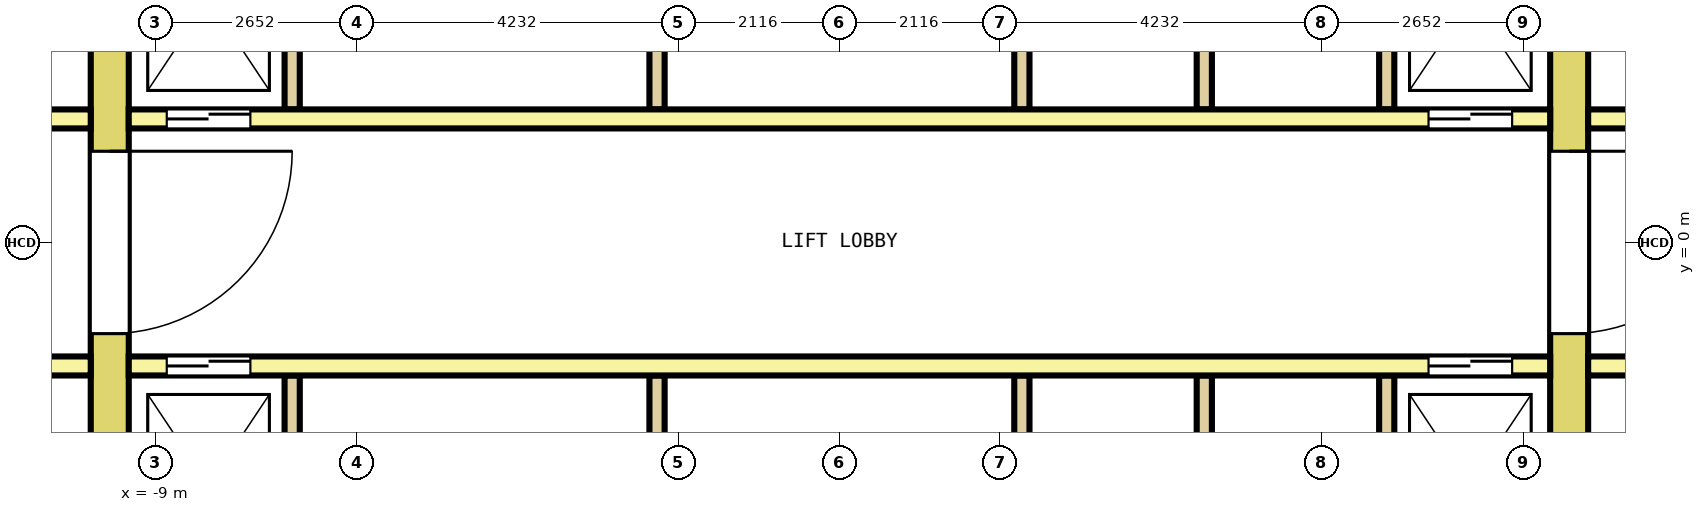
"""IFC4 building model, lengths in metres.
Left out: names, types, materials, properties, quantities, classifications, styles, units other than length and angle.
Written with IfcOpenShell. Run it as: python <this file> out.ifc"""

import sys

from ifc_helpers import new_model, si_unit, direction, frame, frame_2d, origin, place, context, subcontext, project, spatial, rectangle, extrude, element, fill, save


model = new_model("IFC4")
c1 = context("Model", 3, precision=1e-05, world=origin(), true_north=direction((0.0, 1.0)))
c2 = subcontext(c1, "Body", "Model", "MODEL_VIEW")
j1 = project(units=[si_unit("LENGTHUNIT", "METRE"), si_unit("PLANEANGLEUNIT", "RADIAN")], contexts=[c1])
p1 = place(None, origin())
s1 = spatial("IfcSite", under=j1, at=p1, CompositionType="ELEMENT")
p2 = place(p1, origin())
s2 = spatial("IfcBuilding", under=s1, at=p2, CompositionType="ELEMENT")
p3 = place(p2, frame((0.0, 0.0, 58.6)))
s3 = spatial("IfcBuildingStorey", under=s2, at=p3, CompositionType="ELEMENT", Elevation=58.6)
p4 = place(p3, frame((-9.6, -7.7, 0.0), z_axis=(0.0, 0.0, 1.0), x_axis=(0.0, 1.0, 0.0)))
e1 = element("IfcWall", 1, at=p4, inside=s3, PredefinedType="SHEAR", context=c2, shape_type="SweptSolid", body=[
    extrude(rectangle(XDim=15.4, YDim=0.5, at=frame_2d((7.7, 0.0))), origin(), (0.0, 0.0, 1.0), 4.1),
])
p5 = place(p4, frame((6.5, 0.0, 0.0)))
e2 = element("IfcOpeningElement", 2, at=p5, cuts=e1, PredefinedType="OPENING", context=c2, shape_type="SweptSolid", body=[
    extrude(rectangle(XDim=2.4, YDim=2.1, at=frame_2d((1.2, 1.05))), frame((0.0, 0.26, 0.0), z_axis=(0.0, -1.0, 0.0), x_axis=(1.0, 0.0, 0.0)), (0.0, 0.0, 1.0), 0.52),
])
p6 = place(p4, frame((13.4, 0.0, 0.0)))
e3 = element("IfcOpeningElement", 3, at=p6, cuts=e1, PredefinedType="OPENING", context=c2, shape_type="SweptSolid", body=[
    extrude(rectangle(XDim=1.2, YDim=2.1, at=frame_2d((0.6, 1.05))), frame((0.0, 0.26, 0.0), z_axis=(0.0, -1.0, 0.0), x_axis=(1.0, 0.0, 0.0)), (0.0, 0.0, 1.0), 0.52),
])
p7 = place(p4, frame((0.8, 0.0, 0.0)))
e4 = element("IfcOpeningElement", 4, at=p7, cuts=e1, PredefinedType="OPENING", context=c2, shape_type="SweptSolid", body=[
    extrude(rectangle(XDim=1.2, YDim=2.1, at=frame_2d((0.6, 1.05))), frame((0.0, 0.26, 0.0), z_axis=(0.0, -1.0, 0.0), x_axis=(1.0, 0.0, 0.0)), (0.0, 0.0, 1.0), 0.52),
])
p8 = place(p3, frame((9.6, -7.7, 0.0), z_axis=(0.0, 0.0, 1.0), x_axis=(0.0, 1.0, 0.0)))
e5 = element("IfcWall", 5, at=p8, inside=s3, PredefinedType="SHEAR", context=c2, shape_type="SweptSolid", body=[
    extrude(rectangle(XDim=15.4, YDim=0.5, at=frame_2d((7.7, 0.0))), origin(), (0.0, 0.0, 1.0), 4.1),
])
p9 = place(p8, frame((6.5, 0.0, 0.0)))
e6 = element("IfcOpeningElement", 6, at=p9, cuts=e5, PredefinedType="OPENING", context=c2, shape_type="SweptSolid", body=[
    extrude(rectangle(XDim=2.4, YDim=2.1, at=frame_2d((1.2, 1.05))), frame((0.0, 0.26, 0.0), z_axis=(0.0, -1.0, 0.0), x_axis=(1.0, 0.0, 0.0)), (0.0, 0.0, 1.0), 0.52),
])
p10 = place(p8, frame((13.4, 0.0, 0.0)))
e7 = element("IfcOpeningElement", 7, at=p10, cuts=e5, PredefinedType="OPENING", context=c2, shape_type="SweptSolid", body=[
    extrude(rectangle(XDim=1.2, YDim=2.1, at=frame_2d((0.6, 1.05))), frame((0.0, 0.26, 0.0), z_axis=(0.0, -1.0, 0.0), x_axis=(1.0, 0.0, 0.0)), (0.0, 0.0, 1.0), 0.52),
])
p11 = place(p8, frame((0.9, 0.0, 0.0)))
e8 = element("IfcOpeningElement", 8, at=p11, cuts=e5, PredefinedType="OPENING", context=c2, shape_type="SweptSolid", body=[
    extrude(rectangle(XDim=1.0, YDim=2.1, at=frame_2d((0.5, 1.05))), frame((0.0, 0.26, 0.0), z_axis=(0.0, -1.0, 0.0), x_axis=(1.0, 0.0, 0.0)), (0.0, 0.0, 1.0), 0.52),
])
p12 = place(p3, frame((-12.75, 1.625, 0.0), z_axis=(0.0, 0.0, 1.0), x_axis=(1.0, 0.0, 0.0)))
e9 = element("IfcWall", 9, at=p12, inside=s3, PredefinedType="SOLIDWALL", context=c2, shape_type="SweptSolid", body=[
    extrude(rectangle(XDim=2.9, YDim=0.25, at=frame_2d((1.45, 0.0))), origin(), (0.0, 0.0, 1.0), 4.1),
])
p13 = place(p12, frame((0.9, 0.0, 0.0)))
e10 = element("IfcOpeningElement", 10, at=p13, cuts=e9, PredefinedType="OPENING", context=c2, shape_type="SweptSolid", body=[
    extrude(rectangle(XDim=1.1, YDim=2.1, at=frame_2d((0.55, 1.05))), frame((0.0, 0.135, 0.0), z_axis=(0.0, -1.0, 0.0), x_axis=(1.0, 0.0, 0.0)), (0.0, 0.0, 1.0), 0.27),
])
p14 = place(p3, frame((-9.35, 1.625, 0.0), z_axis=(0.0, 0.0, 1.0), x_axis=(1.0, 0.0, 0.0)))
e11 = element("IfcWall", 11, at=p14, inside=s3, PredefinedType="SOLIDWALL", context=c2, shape_type="SweptSolid", body=[
    extrude(rectangle(XDim=18.7, YDim=0.25, at=frame_2d((9.35, 0.0))), origin(), (0.0, 0.0, 1.0), 4.1),
])
p15 = place(p14, frame((0.5, 0.0, 0.0)))
e12 = element("IfcOpeningElement", 12, at=p15, cuts=e11, PredefinedType="OPENING", context=c2, shape_type="SweptSolid", body=[
    extrude(rectangle(XDim=1.1, YDim=2.1, at=frame_2d((0.55, 1.05))), frame((0.0, 0.135, 0.0), z_axis=(0.0, -1.0, 0.0), x_axis=(1.0, 0.0, 0.0)), (0.0, 0.0, 1.0), 0.27),
])
p16 = place(p14, frame((17.1, 0.0, 0.0)))
e13 = element("IfcOpeningElement", 13, at=p16, cuts=e11, PredefinedType="OPENING", context=c2, shape_type="SweptSolid", body=[
    extrude(rectangle(XDim=1.1, YDim=2.1, at=frame_2d((0.55, 1.05))), frame((0.0, 0.135, 0.0), z_axis=(0.0, -1.0, 0.0), x_axis=(1.0, 0.0, 0.0)), (0.0, 0.0, 1.0), 0.27),
])
p17 = place(p3, frame((9.85, 1.625, 0.0), z_axis=(0.0, 0.0, 1.0), x_axis=(1.0, 0.0, 0.0)))
e14 = element("IfcWall", 14, at=p17, inside=s3, PredefinedType="SOLIDWALL", context=c2, shape_type="SweptSolid", body=[
    extrude(rectangle(XDim=2.9, YDim=0.25, at=frame_2d((1.45, 0.0))), origin(), (0.0, 0.0, 1.0), 4.1),
])
p18 = place(p17, frame((0.9, 0.0, 0.0)))
e15 = element("IfcOpeningElement", 15, at=p18, cuts=e14, PredefinedType="OPENING", context=c2, shape_type="SweptSolid", body=[
    extrude(rectangle(XDim=1.1, YDim=2.1, at=frame_2d((0.55, 1.05))), frame((0.0, 0.135, 0.0), z_axis=(0.0, -1.0, 0.0), x_axis=(1.0, 0.0, 0.0)), (0.0, 0.0, 1.0), 0.27),
])
for number, where, z_axis, x_axis in (
    (16, (-7.2, 1.75, 0.0), (0.0, 0.0, 1.0), (0.0, 1.0, 0.0)),
    (17, (-2.4, 1.75, 0.0), (0.0, 0.0, 1.0), (0.0, 1.0, 0.0)),
    (18, (2.4, 1.75, 0.0), (0.0, 0.0, 1.0), (0.0, 1.0, 0.0)),
    (19, (4.8, 1.75, 0.0), (0.0, 0.0, 1.0), (0.0, 1.0, 0.0)),
    (20, (7.2, 1.75, 0.0), (0.0, 0.0, 1.0), (0.0, 1.0, 0.0)),
):
    element("IfcWall", number, at=place(p3, frame(where, z_axis=z_axis, x_axis=x_axis)), inside=s3, PredefinedType="SOLIDWALL", context=c2, shape_type="SweptSolid", body=[
        extrude(rectangle(XDim=2.9, YDim=0.2, at=frame_2d((1.45, 0.0))), origin(), (0.0, 0.0, 1.0), 4.1),
    ])
p19 = place(p3, frame((-12.75, -1.625, 0.0), z_axis=(0.0, 0.0, 1.0), x_axis=(1.0, 0.0, 0.0)))
e21 = element("IfcWall", 21, at=p19, inside=s3, PredefinedType="SOLIDWALL", context=c2, shape_type="SweptSolid", body=[
    extrude(rectangle(XDim=2.9, YDim=0.25, at=frame_2d((1.45, 0.0))), origin(), (0.0, 0.0, 1.0), 4.1),
])
p20 = place(p19, frame((0.9, 0.0, 0.0)))
e22 = element("IfcOpeningElement", 22, at=p20, cuts=e21, PredefinedType="OPENING", context=c2, shape_type="SweptSolid", body=[
    extrude(rectangle(XDim=1.1, YDim=2.1, at=frame_2d((0.55, 1.05))), frame((0.0, 0.135, 0.0), z_axis=(0.0, -1.0, 0.0), x_axis=(1.0, 0.0, 0.0)), (0.0, 0.0, 1.0), 0.27),
])
p21 = place(p3, frame((-9.35, -1.625, 0.0), z_axis=(0.0, 0.0, 1.0), x_axis=(1.0, 0.0, 0.0)))
e23 = element("IfcWall", 23, at=p21, inside=s3, PredefinedType="SOLIDWALL", context=c2, shape_type="SweptSolid", body=[
    extrude(rectangle(XDim=18.7, YDim=0.25, at=frame_2d((9.35, 0.0))), origin(), (0.0, 0.0, 1.0), 4.1),
])
p22 = place(p21, frame((0.5, 0.0, 0.0)))
e24 = element("IfcOpeningElement", 24, at=p22, cuts=e23, PredefinedType="OPENING", context=c2, shape_type="SweptSolid", body=[
    extrude(rectangle(XDim=1.1, YDim=2.1, at=frame_2d((0.55, 1.05))), frame((0.0, 0.135, 0.0), z_axis=(0.0, -1.0, 0.0), x_axis=(1.0, 0.0, 0.0)), (0.0, 0.0, 1.0), 0.27),
])
p23 = place(p21, frame((17.1, 0.0, 0.0)))
e25 = element("IfcOpeningElement", 25, at=p23, cuts=e23, PredefinedType="OPENING", context=c2, shape_type="SweptSolid", body=[
    extrude(rectangle(XDim=1.1, YDim=2.1, at=frame_2d((0.55, 1.05))), frame((0.0, 0.135, 0.0), z_axis=(0.0, -1.0, 0.0), x_axis=(1.0, 0.0, 0.0)), (0.0, 0.0, 1.0), 0.27),
])
p24 = place(p3, frame((9.85, -1.625, 0.0), z_axis=(0.0, 0.0, 1.0), x_axis=(1.0, 0.0, 0.0)))
e26 = element("IfcWall", 26, at=p24, inside=s3, PredefinedType="SOLIDWALL", context=c2, shape_type="SweptSolid", body=[
    extrude(rectangle(XDim=2.9, YDim=0.25, at=frame_2d((1.45, 0.0))), origin(), (0.0, 0.0, 1.0), 4.1),
])
p25 = place(p24, frame((0.9, 0.0, 0.0)))
e27 = element("IfcOpeningElement", 27, at=p25, cuts=e26, PredefinedType="OPENING", context=c2, shape_type="SweptSolid", body=[
    extrude(rectangle(XDim=1.1, YDim=2.1, at=frame_2d((0.55, 1.05))), frame((0.0, 0.135, 0.0), z_axis=(0.0, -1.0, 0.0), x_axis=(1.0, 0.0, 0.0)), (0.0, 0.0, 1.0), 0.27),
])
for number, where, z_axis, x_axis in (
    (28, (-7.2, -4.65, 0.0), (0.0, 0.0, 1.0), (0.0, 1.0, 0.0)),
    (29, (-2.4, -4.65, 0.0), (0.0, 0.0, 1.0), (0.0, 1.0, 0.0)),
    (30, (2.4, -4.65, 0.0), (0.0, 0.0, 1.0), (0.0, 1.0, 0.0)),
    (31, (4.8, -4.65, 0.0), (0.0, 0.0, 1.0), (0.0, 1.0, 0.0)),
    (32, (7.2, -4.65, 0.0), (0.0, 0.0, 1.0), (0.0, 1.0, 0.0)),
):
    element("IfcWall", number, at=place(p3, frame(where, z_axis=z_axis, x_axis=x_axis)), inside=s3, PredefinedType="SOLIDWALL", context=c2, shape_type="SweptSolid", body=[
        extrude(rectangle(XDim=2.9, YDim=0.2, at=frame_2d((1.45, 0.0))), origin(), (0.0, 0.0, 1.0), 4.1),
    ])
p26 = place(p15, origin())
e33 = element("IfcDoor", 33, at=p26, inside=s3, OperationType="DOUBLE_DOOR_SLIDING", PredefinedType="DOOR", context=c2, shape_type="SweptSolid", body=[
    extrude(rectangle(XDim=1.1, YDim=2.1, at=frame_2d((0.55, 1.05))), frame((0.0, 0.075, 0.0), z_axis=(0.0, -1.0, 0.0), x_axis=(1.0, 0.0, 0.0)), (0.0, 0.0, 1.0), 0.15),
])
fill(e12, e33)
p27 = place(p16, origin())
e34 = element("IfcDoor", 34, at=p27, inside=s3, OperationType="DOUBLE_DOOR_SLIDING", PredefinedType="DOOR", context=c2, shape_type="SweptSolid", body=[
    extrude(rectangle(XDim=1.1, YDim=2.1, at=frame_2d((0.55, 1.05))), frame((0.0, 0.075, 0.0), z_axis=(0.0, -1.0, 0.0), x_axis=(1.0, 0.0, 0.0)), (0.0, 0.0, 1.0), 0.15),
])
fill(e13, e34)
p28 = place(p22, origin())
e35 = element("IfcDoor", 35, at=p28, inside=s3, OperationType="DOUBLE_DOOR_SLIDING", PredefinedType="DOOR", context=c2, shape_type="SweptSolid", body=[
    extrude(rectangle(XDim=1.1, YDim=2.1, at=frame_2d((0.55, 1.05))), frame((0.0, 0.075, 0.0), z_axis=(0.0, -1.0, 0.0), x_axis=(1.0, 0.0, 0.0)), (0.0, 0.0, 1.0), 0.15),
])
fill(e24, e35)
p29 = place(p23, origin())
e36 = element("IfcDoor", 36, at=p29, inside=s3, OperationType="DOUBLE_DOOR_SLIDING", PredefinedType="DOOR", context=c2, shape_type="SweptSolid", body=[
    extrude(rectangle(XDim=1.1, YDim=2.1, at=frame_2d((0.55, 1.05))), frame((0.0, 0.075, 0.0), z_axis=(0.0, -1.0, 0.0), x_axis=(1.0, 0.0, 0.0)), (0.0, 0.0, 1.0), 0.15),
])
fill(e25, e36)
p30 = place(p5, origin())
e37 = element("IfcDoor", 37, at=p30, inside=s3, OperationType="DOUBLE_DOOR_SINGLE_SWING", PredefinedType="DOOR", context=c2, shape_type="SweptSolid", body=[
    extrude(rectangle(XDim=2.4, YDim=2.1, at=frame_2d((1.2, 1.05))), frame((0.0, 0.2, 0.0), z_axis=(0.0, -1.0, 0.0), x_axis=(1.0, 0.0, 0.0)), (0.0, 0.0, 1.0), 0.4),
])
fill(e2, e37)
p31 = place(p9, origin())
e38 = element("IfcDoor", 38, at=p31, inside=s3, OperationType="DOUBLE_DOOR_SINGLE_SWING", PredefinedType="DOOR", context=c2, shape_type="SweptSolid", body=[
    extrude(rectangle(XDim=2.4, YDim=2.1, at=frame_2d((1.2, 1.05))), frame((0.0, 0.2, 0.0), z_axis=(0.0, -1.0, 0.0), x_axis=(1.0, 0.0, 0.0)), (0.0, 0.0, 1.0), 0.4),
])
fill(e6, e38)
save(model, sys.argv[1])
